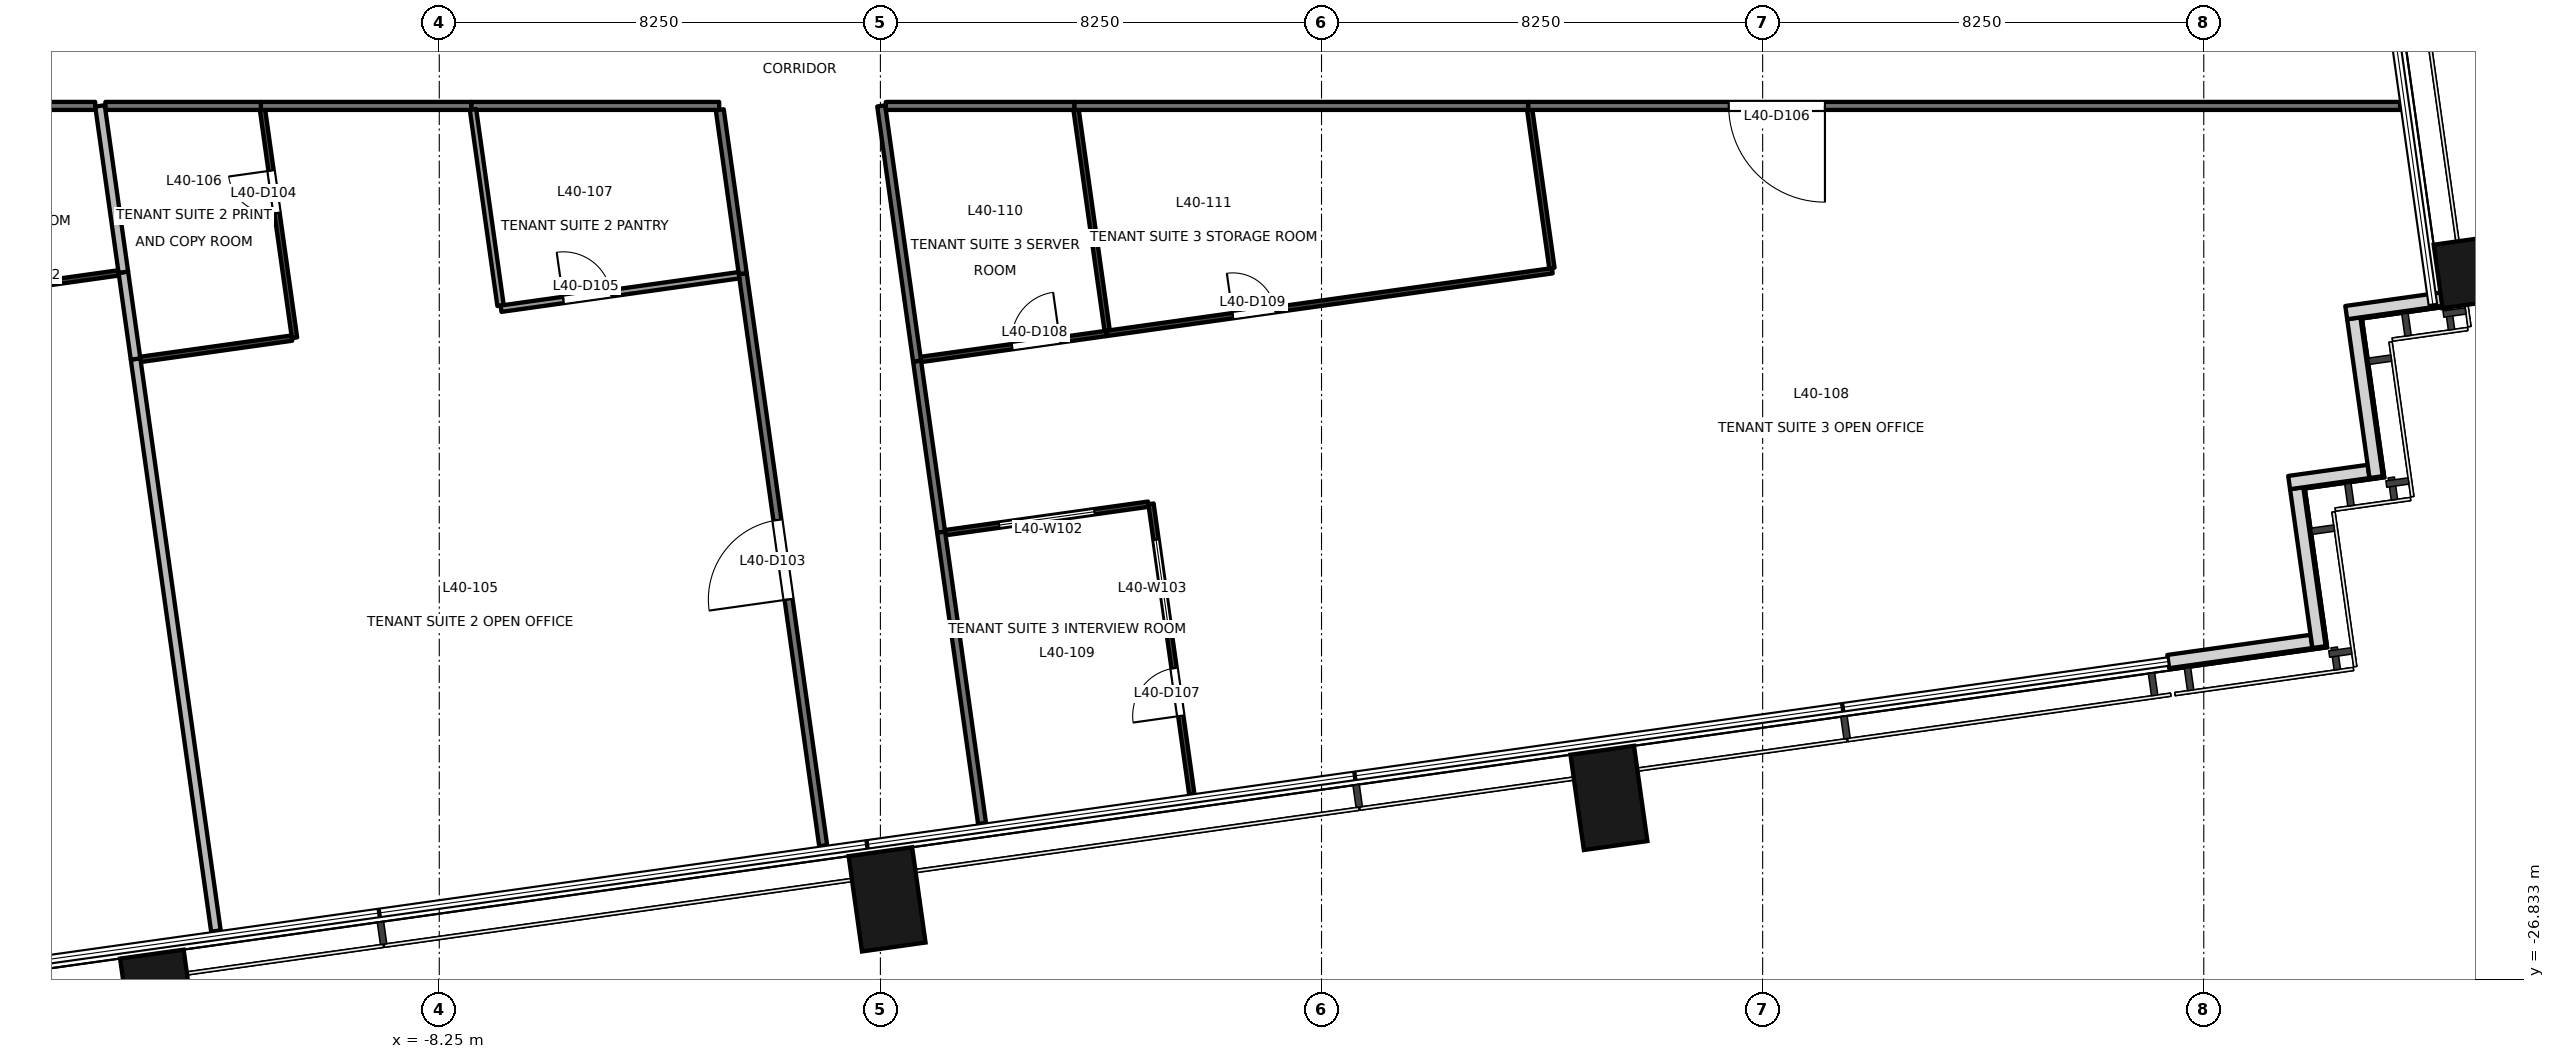
"""IFC4 building model, lengths in metres.
Left out: names, types, materials, properties, quantities, classifications, styles, units other than length and angle.
Written with IfcOpenShell. Run it as: python <this file> out.ifc"""

import sys

from ifc_helpers import new_model, si_unit, direction, frame, frame_2d, origin, origin_2d, place, context, subcontext, project, spatial, rectangle, extrude, element, fill, save


model = new_model("IFC4")
c1 = context("Model", 3, precision=1e-05, world=origin(), true_north=direction((0.0, 1.0)))
c2 = subcontext(c1, "Body", "Model", "MODEL_VIEW")
j1 = project(units=[si_unit("LENGTHUNIT", "METRE"), si_unit("PLANEANGLEUNIT", "RADIAN")], contexts=[c1])
p1 = place(None, origin())
s1 = spatial("IfcSite", under=j1, at=p1, CompositionType="ELEMENT")
p2 = place(p1, origin())
s2 = spatial("IfcBuilding", under=s1, at=p2, CompositionType="ELEMENT")
p3 = place(p2, frame((0.0, 0.0, 176.3)))
s3 = spatial("IfcBuildingStorey", under=s2, at=p3, CompositionType="ELEMENT", Elevation=176.3)
for number, where, z_axis, x_axis in (
    (1, (-13.5, -27.256, -0.2), (0.0, 0.0, 1.0), (0.99, 0.139, 0.0)),
    (2, (0.125, -25.34, -0.2), (0.0, 0.0, 1.0), (0.99, 0.139, 0.0)),
    (3, (13.625, -23.443, -0.2), (0.0, 0.0, 1.0), (0.99, 0.139, 0.0)),
    (4, (30.024, -13.565, -0.2), (0.0, 0.0, 1.0), (-0.139, 0.99, 0.0)),
):
    element("IfcColumn", number, at=place(p3, frame(where, z_axis=z_axis, x_axis=x_axis)), inside=s3, PredefinedType="COLUMN", context=c2, shape_type="SweptSolid", body=[
        extrude(rectangle(XDim=1.2, YDim=1.8, at=origin_2d()), origin(), (0.0, 0.0, 1.0), 3.9),
    ])
p4 = place(p3, frame((24.085, -20.893, 0.0), z_axis=(0.0, 0.0, 1.0), x_axis=(0.990255800966, 0.139260362823, 0.0)))
e5 = element("IfcWall", 5, at=p4, inside=s3, PredefinedType="SOLIDWALL", context=c2, shape_type="SweptSolid", body=[
    extrude(rectangle(XDim=2.705, YDim=0.25, at=frame_2d((1.353, 0.0))), origin(), (0.0, 0.0, 1.0), 3.7),
])
p5 = place(p3, frame((26.905, -20.622, 0.0), z_axis=(0.0, 0.0, 1.0), x_axis=(-0.139313431826, 0.990248336385, 0.0)))
e6 = element("IfcWall", 6, at=p5, inside=s3, PredefinedType="SOLIDWALL", context=c2, shape_type="SweptSolid", body=[
    extrude(rectangle(XDim=3.0, YDim=0.25, at=frame_2d((1.5, 0.0))), origin(), (0.0, 0.0, 1.0), 3.7),
])
p6 = place(p3, frame((26.346, -17.544, 0.0), z_axis=(0.0, 0.0, 1.0), x_axis=(0.990368090482, 0.13845954411, 0.0)))
e7 = element("IfcWall", 7, at=p6, inside=s3, PredefinedType="SOLIDWALL", context=c2, shape_type="SweptSolid", body=[
    extrude(rectangle(XDim=1.5, YDim=0.25, at=frame_2d((0.75, 0.0))), origin(), (0.0, 0.0, 1.0), 3.7),
])
p7 = place(p3, frame((27.973, -17.443, 0.0), z_axis=(0.0, 0.0, 1.0), x_axis=(-0.139313431826, 0.990248336385, 0.0)))
e8 = element("IfcWall", 8, at=p7, inside=s3, PredefinedType="SOLIDWALL", context=c2, shape_type="SweptSolid", body=[
    extrude(rectangle(XDim=3.0, YDim=0.25, at=frame_2d((1.5, 0.0))), origin(), (0.0, 0.0, 1.0), 3.7),
])
p8 = place(p3, frame((27.414, -14.366, 0.0), z_axis=(0.0, 0.0, 1.0), x_axis=(0.990256286673, 0.139256908998, 0.0)))
e9 = element("IfcWall", 9, at=p8, inside=s3, PredefinedType="SOLIDWALL", context=c2, shape_type="SweptSolid", body=[
    extrude(rectangle(XDim=1.801, YDim=0.25, at=frame_2d((0.9, 0.0))), origin(), (0.0, 0.0, 1.0), 3.7),
])
p9 = place(p3, frame((-14.684, -10.5, 0.0), z_axis=(0.0, 0.0, 1.0), x_axis=(-1.0, 0.0, 0.0)))
e10 = element("IfcWall", 10, at=p9, inside=s3, PredefinedType="PARTITIONING", context=c2, shape_type="SweptSolid", body=[
    extrude(rectangle(XDim=4.882, YDim=0.15, at=frame_2d((2.441, 0.0))), origin(), (0.0, 0.0, 1.0), 3.7),
])
p10 = place(p3, frame((-7.648, -10.5, 0.0), z_axis=(0.0, 0.0, 1.0), x_axis=(-1.0, 0.0, 0.0)))
e11 = element("IfcWall", 11, at=p10, inside=s3, PredefinedType="PARTITIONING", context=c2, shape_type="SweptSolid", body=[
    extrude(rectangle(XDim=3.938, YDim=0.15, at=frame_2d((1.969, 0.0))), origin(), (0.0, 0.0, 1.0), 2.8),
])
p11 = place(p3, frame((-1.07, -24.337, 0.0), z_axis=(0.0, 0.0, 1.0), x_axis=(-0.139184552649, 0.990266459244, 0.0)))
e12 = element("IfcWall", 12, at=p11, inside=s3, PredefinedType="PARTITIONING", context=c2, shape_type="SweptSolid", body=[
    extrude(rectangle(XDim=10.805, YDim=0.15, at=frame_2d((5.403, 0.0))), origin(), (0.0, 0.0, 1.0), 3.7),
])
p12 = place(p11, frame((4.652, 0.0, 0.0)))
e13 = element("IfcOpeningElement", 13, at=p12, cuts=e12, PredefinedType="OPENING", context=c2, shape_type="SweptSolid", body=[
    extrude(rectangle(XDim=1.5, YDim=2.1, at=frame_2d((0.75, 1.05))), frame((0.0, 0.085, 0.0), z_axis=(0.0, -1.0, 0.0), x_axis=(1.0, 0.0, 0.0)), (0.0, 0.0, 1.0), 0.171),
])
p13 = place(p3, frame((-11.586, -10.5, 0.0), z_axis=(0.0, 0.0, 1.0), x_axis=(-1.0, 0.0, 0.0)))
e14 = element("IfcWall", 14, at=p13, inside=s3, PredefinedType="PARTITIONING", context=c2, shape_type="SweptSolid", body=[
    extrude(rectangle(XDim=2.908, YDim=0.15, at=frame_2d((1.454, 0.0))), origin(), (0.0, 0.0, 1.0), 2.8),
])
p14 = place(p3, frame((-3.015, -10.5, 0.0), z_axis=(0.0, 0.0, 1.0), x_axis=(-1.0, 0.0, 0.0)))
e15 = element("IfcWall", 15, at=p14, inside=s3, PredefinedType="PARTITIONING", context=c2, shape_type="SweptSolid", body=[
    extrude(rectangle(XDim=4.633, YDim=0.15, at=frame_2d((2.316, 0.0))), origin(), (0.0, 0.0, 1.0), 2.9),
])
p15 = place(p3, frame((-2.574, -13.637, 0.0), z_axis=(0.0, 0.0, 1.0), x_axis=(-0.138957403221, 0.990298359127, 0.0)))
e16 = element("IfcWall", 16, at=p15, inside=s3, PredefinedType="PARTITIONING", context=c2, shape_type="SweptSolid", body=[
    extrude(rectangle(XDim=3.094, YDim=0.15, at=frame_2d((1.547, 0.0))), origin(), (0.0, 0.0, 1.0), 3.7),
])
p16 = place(p3, frame((0.686, -15.273, 0.0), z_axis=(0.0, 0.0, 1.0), x_axis=(0.139242097723, -0.990258369428, 0.0)))
e17 = element("IfcWall", 17, at=p16, inside=s3, PredefinedType="PARTITIONING", context=c2, shape_type="SweptSolid", body=[
    extrude(rectangle(XDim=3.231, YDim=0.15, at=frame_2d((1.616, 0.0))), origin(), (0.0, 0.0, 1.0), 3.7),
])
p17 = place(p3, frame((28.421, -10.5, 0.0), z_axis=(0.0, 0.0, 1.0), x_axis=(-1.0, 0.0, 0.0)))
e18 = element("IfcWall", 18, at=p17, inside=s3, PredefinedType="PARTITIONING", context=c2, shape_type="SweptSolid", body=[
    extrude(rectangle(XDim=16.308, YDim=0.15, at=frame_2d((8.154, 0.0))), origin(), (0.0, 0.0, 1.0), 3.1),
])
p18 = place(p17, frame((10.756, 0.0, 0.0)))
e19 = element("IfcOpeningElement", 19, at=p18, cuts=e18, PredefinedType="OPENING", context=c2, shape_type="SweptSolid", body=[
    extrude(rectangle(XDim=1.8, YDim=2.1, at=frame_2d((0.9, 1.05))), frame((0.0, 0.085, 0.0), z_axis=(0.0, -1.0, 0.0), x_axis=(1.0, 0.0, 0.0)), (0.0, 0.0, 1.0), 0.171),
])
p19 = place(p3, frame((1.136, -18.473, 0.0), z_axis=(0.0, 0.0, 1.0), x_axis=(0.139059647431, -0.990284006968, 0.0)))
e20 = element("IfcWall", 20, at=p19, inside=s3, PredefinedType="PARTITIONING", context=c2, shape_type="SweptSolid", body=[
    extrude(rectangle(XDim=5.5, YDim=0.15, at=frame_2d((2.75, 0.0))), origin(), (0.0, 0.0, 1.0), 3.7),
])
p20 = place(p3, frame((0.015, -10.5, 0.0), z_axis=(0.0, 0.0, 1.0), x_axis=(0.139243966004, -0.990258106723, 0.0)))
e21 = element("IfcWall", 21, at=p20, inside=s3, PredefinedType="PARTITIONING", context=c2, shape_type="SweptSolid", body=[
    extrude(rectangle(XDim=4.82, YDim=0.15, at=frame_2d((2.41, 0.0))), origin(), (0.0, 0.0, 1.0), 2.9),
])
p21 = place(p3, frame((3.63, -10.5, 0.0), z_axis=(0.0, 0.0, 1.0), x_axis=(-1.0, 0.0, 0.0)))
e22 = element("IfcWall", 22, at=p21, inside=s3, PredefinedType="PARTITIONING", context=c2, shape_type="SweptSolid", body=[
    extrude(rectangle(XDim=3.529, YDim=0.15, at=frame_2d((1.764, 0.0))), origin(), (0.0, 0.0, 1.0), 2.9),
])
p22 = place(p3, frame((12.113, -10.5, 0.0), z_axis=(0.0, 0.0, 1.0), x_axis=(-1.0, 0.0, 0.0)))
e23 = element("IfcWall", 23, at=p22, inside=s3, PredefinedType="PARTITIONING", context=c2, shape_type="SweptSolid", body=[
    extrude(rectangle(XDim=8.483, YDim=0.15, at=frame_2d((4.242, 0.0))), origin(), (0.0, 0.0, 1.0), 2.9),
])
p23 = place(p3, frame((-19.013, -14.293, 0.0), z_axis=(0.0, 0.0, 1.0), x_axis=(0.990264556242, 0.139198091406, 0.0)))
e24 = element("IfcWall", 24, at=p23, inside=s3, PredefinedType="PARTITIONING", context=c2, shape_type="SweptSolid", body=[
    extrude(rectangle(XDim=4.813, YDim=0.1, at=frame_2d((2.406, 0.0))), origin(), (0.0, 0.0, 1.0), 3.7),
])
p24 = place(p23, frame((2.709, 0.0, 0.0)))
e25 = element("IfcOpeningElement", 25, at=p24, cuts=e24, PredefinedType="OPENING", context=c2, shape_type="SweptSolid", body=[
    extrude(rectangle(XDim=0.8, YDim=2.1, at=frame_2d((0.4, 1.05))), frame((0.0, 0.061, 0.0), z_axis=(0.0, -1.0, 0.0), x_axis=(1.0, 0.0, 0.0)), (0.0, 0.0, 1.0), 0.121),
])
p25 = place(p3, frame((-13.93, -15.233, 0.0), z_axis=(0.0, 0.0, 1.0), x_axis=(0.139092809985, -0.990279349583, 0.0)))
e26 = element("IfcWall", 26, at=p25, inside=s3, PredefinedType="PARTITIONING", context=c2, shape_type="SweptSolid", body=[
    extrude(rectangle(XDim=10.805, YDim=0.18, at=frame_2d((5.403, 0.0))), origin(), (0.0, 0.0, 1.0), 2.8),
])
p26 = place(p3, frame((-14.158, -13.611, 0.0), z_axis=(0.0, 0.0, 1.0), x_axis=(0.139229707098, -0.990260111618, 0.0)))
e27 = element("IfcWall", 27, at=p26, inside=s3, PredefinedType="PARTITIONING", context=c2, shape_type="SweptSolid", body=[
    extrude(rectangle(XDim=1.638, YDim=0.18, at=frame_2d((0.819, 0.0))), origin(), (0.0, 0.0, 1.0), 3.7),
])
p27 = place(p3, frame((-14.595, -10.5, 0.0), z_axis=(0.0, 0.0, 1.0), x_axis=(0.139103611391, -0.990277832377, 0.0)))
e28 = element("IfcWall", 28, at=p27, inside=s3, PredefinedType="PARTITIONING", context=c2, shape_type="SweptSolid", body=[
    extrude(rectangle(XDim=3.142, YDim=0.18, at=frame_2d((1.571, 0.0))), origin(), (0.0, 0.0, 1.0), 3.7),
])
p28 = place(p3, frame((-13.838, -15.241, 0.0), z_axis=(0.0, 0.0, 1.0), x_axis=(0.990263018372, 0.139209031475, 0.0)))
e29 = element("IfcWall", 29, at=p28, inside=s3, PredefinedType="PARTITIONING", context=c2, shape_type="SweptSolid", body=[
    extrude(rectangle(XDim=2.859, YDim=0.1, at=frame_2d((1.429, 0.0))), origin(), (0.0, 0.0, 1.0), 2.8),
])
p29 = place(p3, frame((-10.957, -14.836, 0.0), z_axis=(0.0, 0.0, 1.0), x_axis=(-0.138962312518, 0.990297670249, 0.0)))
e30 = element("IfcWall", 30, at=p29, inside=s3, PredefinedType="PARTITIONING", context=c2, shape_type="SweptSolid", body=[
    extrude(rectangle(XDim=4.31, YDim=0.1, at=frame_2d((2.155, 0.0))), origin(), (0.0, 0.0, 1.0), 3.7),
])
p30 = place(p29, frame((2.357, 0.0, 0.0)))
e31 = element("IfcOpeningElement", 31, at=p30, cuts=e30, PredefinedType="OPENING", context=c2, shape_type="SweptSolid", body=[
    extrude(rectangle(XDim=0.8, YDim=2.1, at=frame_2d((0.4, 1.05))), frame((0.0, 0.061, 0.0), z_axis=(0.0, -1.0, 0.0), x_axis=(1.0, 0.0, 0.0)), (0.0, 0.0, 1.0), 0.121),
])
p31 = place(p3, frame((-7.619, -10.567, 0.0), z_axis=(0.0, 0.0, 1.0), x_axis=(0.13904874823, -0.990285537416, 0.0)))
e32 = element("IfcWall", 32, at=p31, inside=s3, PredefinedType="PARTITIONING", context=c2, shape_type="SweptSolid", body=[
    extrude(rectangle(XDim=3.703, YDim=0.12, at=frame_2d((1.852, 0.0))), origin(), (0.0, 0.0, 1.0), 3.7),
])
p32 = place(p3, frame((-7.095, -14.293, 0.0), z_axis=(0.0, 0.0, 1.0), x_axis=(0.990250373685, 0.139298949807, 0.0)))
e33 = element("IfcWall", 33, at=p32, inside=s3, PredefinedType="PARTITIONING", context=c2, shape_type="SweptSolid", body=[
    extrude(rectangle(XDim=4.494, YDim=0.12, at=frame_2d((2.247, 0.0))), origin(), (0.0, 0.0, 1.0), 2.9),
])
p33 = place(p32, frame((1.178, 0.0, 0.0)))
e34 = element("IfcOpeningElement", 34, at=p33, cuts=e33, PredefinedType="OPENING", context=c2, shape_type="SweptSolid", body=[
    extrude(rectangle(XDim=0.9, YDim=2.1, at=frame_2d((0.45, 1.05))), frame((0.0, 0.071, 0.0), z_axis=(0.0, -1.0, 0.0), x_axis=(1.0, 0.0, 0.0)), (0.0, 0.0, 1.0), 0.141),
])
p34 = place(p3, frame((5.011, -17.949, 0.0), z_axis=(0.0, 0.0, 1.0), x_axis=(-0.99029781958, -0.138961248322, 0.0)))
e35 = element("IfcWall", 35, at=p34, inside=s3, PredefinedType="PARTITIONING", context=c2, shape_type="SweptSolid", body=[
    extrude(rectangle(XDim=3.835, YDim=0.1, at=frame_2d((1.917, 0.0))), origin(), (0.0, 0.0, 1.0), 2.9),
])
p35 = place(p34, frame((1.018, 0.0, 0.9)))
e36 = element("IfcOpeningElement", 36, at=p35, cuts=e35, PredefinedType="OPENING", context=c2, shape_type="SweptSolid", body=[
    extrude(rectangle(XDim=1.8, YDim=1.2, at=frame_2d((0.9, 0.6))), frame((0.0, 0.061, 0.0), z_axis=(0.0, -1.0, 0.0), x_axis=(1.0, 0.0, 0.0)), (0.0, 0.0, 1.0), 0.121),
])
p36 = place(p3, frame((5.823, -23.368, 0.0), z_axis=(0.0, 0.0, 1.0), x_axis=(-0.13906298859, 0.990283537783, 0.0)))
e37 = element("IfcWall", 37, at=p36, inside=s3, PredefinedType="PARTITIONING", context=c2, shape_type="SweptSolid", body=[
    extrude(rectangle(XDim=5.479, YDim=0.1, at=frame_2d((2.74, 0.0))), origin(), (0.0, 0.0, 1.0), 3.7),
])
p37 = place(p36, frame((1.474, 0.0, 0.0)))
e38 = element("IfcOpeningElement", 38, at=p37, cuts=e37, PredefinedType="OPENING", context=c2, shape_type="SweptSolid", body=[
    extrude(rectangle(XDim=0.9, YDim=2.1, at=frame_2d((0.45, 1.05))), frame((0.0, 0.061, 0.0), z_axis=(0.0, -1.0, 0.0), x_axis=(1.0, 0.0, 0.0)), (0.0, 0.0, 1.0), 0.121),
])
p38 = place(p36, frame((3.002, 0.0, 0.9)))
e39 = element("IfcOpeningElement", 39, at=p38, cuts=e37, PredefinedType="OPENING", context=c2, shape_type="SweptSolid", body=[
    extrude(rectangle(XDim=1.8, YDim=1.2, at=frame_2d((0.9, 0.6))), frame((0.0, 0.061, 0.0), z_axis=(0.0, -1.0, 0.0), x_axis=(1.0, 0.0, 0.0)), (0.0, 0.0, 1.0), 0.121),
])
p39 = place(p3, frame((0.758, -15.242, 0.0), z_axis=(0.0, 0.0, 1.0), x_axis=(0.990292126352, 0.139001814682, 0.0)))
e40 = element("IfcWall", 40, at=p39, inside=s3, PredefinedType="PARTITIONING", context=c2, shape_type="SweptSolid", body=[
    extrude(rectangle(XDim=3.504, YDim=0.1, at=frame_2d((1.752, 0.0))), origin(), (0.0, 0.0, 1.0), 3.7),
])
p40 = place(p39, frame((1.723, 0.0, 0.0)))
e41 = element("IfcOpeningElement", 41, at=p40, cuts=e40, PredefinedType="OPENING", context=c2, shape_type="SweptSolid", body=[
    extrude(rectangle(XDim=0.9, YDim=2.1, at=frame_2d((0.45, 1.05))), frame((0.0, 0.061, 0.0), z_axis=(0.0, -1.0, 0.0), x_axis=(1.0, 0.0, 0.0)), (0.0, 0.0, 1.0), 0.121),
])
p41 = place(p3, frame((4.228, -14.755, 0.0), z_axis=(0.0, 0.0, 1.0), x_axis=(0.990267072018, 0.139180192835, 0.0)))
e42 = element("IfcWall", 42, at=p41, inside=s3, PredefinedType="PARTITIONING", context=c2, shape_type="SweptSolid", body=[
    extrude(rectangle(XDim=8.42, YDim=0.1, at=frame_2d((4.21, 0.0))), origin(), (0.0, 0.0, 1.0), 2.9),
])
p42 = place(p41, frame((2.386, 0.0, 0.0)))
e43 = element("IfcOpeningElement", 43, at=p42, cuts=e42, PredefinedType="OPENING", context=c2, shape_type="SweptSolid", body=[
    extrude(rectangle(XDim=0.8, YDim=2.1, at=frame_2d((0.4, 1.05))), frame((0.0, 0.061, 0.0), z_axis=(0.0, -1.0, 0.0), x_axis=(1.0, 0.0, 0.0)), (0.0, 0.0, 1.0), 0.121),
])
p43 = place(p3, frame((12.559, -13.533, 0.0), z_axis=(0.0, 0.0, 1.0), x_axis=(-0.138954956276, 0.990298702476, 0.0)))
e44 = element("IfcWall", 44, at=p43, inside=s3, PredefinedType="PARTITIONING", context=c2, shape_type="SweptSolid", body=[
    extrude(rectangle(XDim=2.994, YDim=0.1, at=frame_2d((1.497, 0.0))), origin(), (0.0, 0.0, 1.0), 3.7),
])
p44 = place(p3, frame((3.659, -10.568, 0.0), z_axis=(0.0, 0.0, 1.0), x_axis=(0.139423291569, -0.990232874514, 0.0)))
e45 = element("IfcWall", 45, at=p44, inside=s3, PredefinedType="PARTITIONING", context=c2, shape_type="SweptSolid", body=[
    extrude(rectangle(XDim=4.175, YDim=0.1, at=frame_2d((2.087, 0.0))), origin(), (0.0, 0.0, 1.0), 3.7),
])
p45 = place(p12, origin())
e46 = element("IfcDoor", 46, at=p45, inside=s3, OperationType="DOUBLE_DOOR_SINGLE_SWING", PredefinedType="DOOR", context=c2, shape_type="SweptSolid", body=[
    extrude(rectangle(XDim=1.5, YDim=2.1, at=frame_2d((0.75, 1.05))), frame((0.0, 0.025, 0.0), z_axis=(0.0, -1.0, 0.0), x_axis=(1.0, 0.0, 0.0)), (0.0, 0.0, 1.0), 0.05),
])
fill(e13, e46)
p46 = place(p30, origin())
e47 = element("IfcDoor", 47, at=p46, inside=s3, OperationType="SINGLE_SWING_RIGHT", PredefinedType="DOOR", context=c2, shape_type="SweptSolid", body=[
    extrude(rectangle(XDim=0.8, YDim=2.1, at=frame_2d((0.4, 1.05))), frame((0.0, 0.025, 0.0), z_axis=(0.0, -1.0, 0.0), x_axis=(1.0, 0.0, 0.0)), (0.0, 0.0, 1.0), 0.05),
])
fill(e31, e47)
p47 = place(p33, origin())
e48 = element("IfcDoor", 48, at=p47, inside=s3, OperationType="SINGLE_SWING_LEFT", PredefinedType="DOOR", context=c2, shape_type="SweptSolid", body=[
    extrude(rectangle(XDim=0.9, YDim=2.1, at=frame_2d((0.45, 1.05))), frame((0.0, 0.025, 0.0), z_axis=(0.0, -1.0, 0.0), x_axis=(1.0, 0.0, 0.0)), (0.0, 0.0, 1.0), 0.05),
])
fill(e34, e48)
p48 = place(p18, origin())
e49 = element("IfcDoor", 49, at=p48, inside=s3, OperationType="DOUBLE_DOOR_SINGLE_SWING", PredefinedType="DOOR", context=c2, shape_type="SweptSolid", body=[
    extrude(rectangle(XDim=1.8, YDim=2.1, at=frame_2d((0.9, 1.05))), frame((0.0, 0.025, 0.0), z_axis=(0.0, -1.0, 0.0), x_axis=(1.0, 0.0, 0.0)), (0.0, 0.0, 1.0), 0.05),
])
fill(e19, e49)
p49 = place(p37, origin())
e50 = element("IfcDoor", 50, at=p49, inside=s3, OperationType="SINGLE_SWING_LEFT", PredefinedType="DOOR", context=c2, shape_type="SweptSolid", body=[
    extrude(rectangle(XDim=0.9, YDim=2.1, at=frame_2d((0.45, 1.05))), frame((0.0, 0.025, 0.0), z_axis=(0.0, -1.0, 0.0), x_axis=(1.0, 0.0, 0.0)), (0.0, 0.0, 1.0), 0.05),
])
fill(e38, e50)
p50 = place(p40, origin())
e51 = element("IfcDoor", 51, at=p50, inside=s3, OperationType="SINGLE_SWING_RIGHT", PredefinedType="DOOR", context=c2, shape_type="SweptSolid", body=[
    extrude(rectangle(XDim=0.9, YDim=2.1, at=frame_2d((0.45, 1.05))), frame((0.0, 0.025, 0.0), z_axis=(0.0, -1.0, 0.0), x_axis=(1.0, 0.0, 0.0)), (0.0, 0.0, 1.0), 0.05),
])
fill(e41, e51)
p51 = place(p42, origin())
e52 = element("IfcDoor", 52, at=p51, inside=s3, OperationType="SINGLE_SWING_LEFT", PredefinedType="DOOR", context=c2, shape_type="SweptSolid", body=[
    extrude(rectangle(XDim=0.8, YDim=2.1, at=frame_2d((0.4, 1.05))), frame((0.0, 0.025, 0.0), z_axis=(0.0, -1.0, 0.0), x_axis=(1.0, 0.0, 0.0)), (0.0, 0.0, 1.0), 0.05),
])
fill(e43, e52)
p52 = place(p35, origin())
e53 = element("IfcWindow", 53, at=p52, inside=s3, PartitioningType="SINGLE_PANEL", PredefinedType="WINDOW", context=c2, shape_type="SweptSolid", body=[
    extrude(rectangle(XDim=1.8, YDim=1.2, at=frame_2d((0.9, 0.6))), frame((0.0, 0.03, 0.0), z_axis=(0.0, -1.0, 0.0), x_axis=(1.0, 0.0, 0.0)), (0.0, 0.0, 1.0), 0.06),
])
fill(e36, e53)
p53 = place(p38, origin())
e54 = element("IfcWindow", 54, at=p53, inside=s3, PartitioningType="SINGLE_PANEL", PredefinedType="WINDOW", context=c2, shape_type="SweptSolid", body=[
    extrude(rectangle(XDim=1.8, YDim=1.2, at=frame_2d((0.9, 0.6))), frame((0.0, 0.03, 0.0), z_axis=(0.0, -1.0, 0.0), x_axis=(1.0, 0.0, 0.0)), (0.0, 0.0, 1.0), 0.06),
])
fill(e39, e54)
save(model, sys.argv[1])
